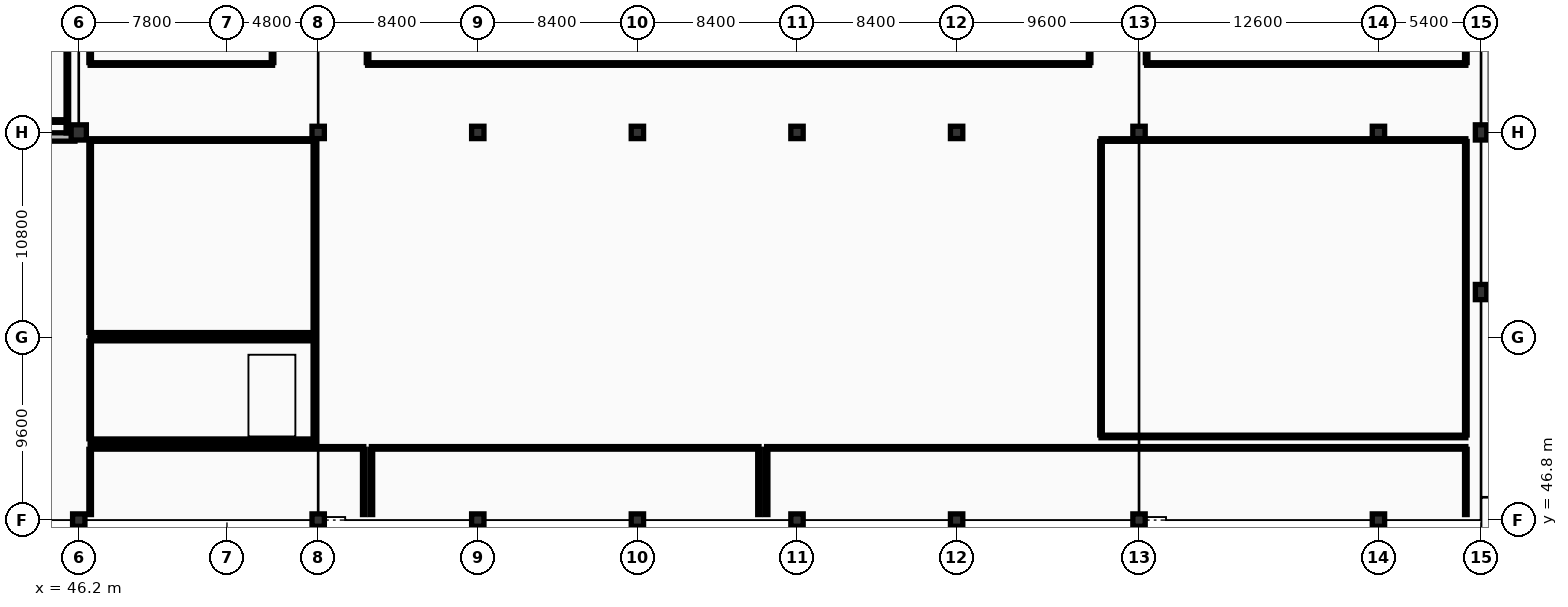
"""IFC4 building model, lengths in metres.
Left out: names, types, materials, properties, quantities, classifications, styles, units other than length and angle.
Written with IfcOpenShell. Run it as: python <this file> out.ifc"""

import sys

from ifc_helpers import new_model, si_unit, direction, frame, frame_2d, origin, origin_2d, place, context, subcontext, project, spatial, rectangle, extrude, element, fill, save


model = new_model("IFC4")
c1 = context("Model", 3, precision=1e-05, world=origin(), true_north=direction((0.0, 1.0)))
c2 = subcontext(c1, "Body", "Model", "MODEL_VIEW")
j1 = project(units=[si_unit("LENGTHUNIT", "METRE"), si_unit("PLANEANGLEUNIT", "RADIAN")], contexts=[c1])
p1 = place(None, origin())
s1 = spatial("IfcSite", under=j1, at=p1, CompositionType="ELEMENT")
p2 = place(p1, origin())
s2 = spatial("IfcBuilding", under=s1, at=p2, CompositionType="ELEMENT")
p3 = place(p2, origin())
s3 = spatial("IfcBuildingStorey", under=s2, at=p3, CompositionType="ELEMENT", Elevation=0.0)
p4 = place(p3, frame((46.2, 67.2, 0.0), z_axis=(0.0, 0.0, 1.0), x_axis=(1.0, 0.0, 0.0)))
e1 = element("IfcColumn", 1, at=p4, inside=s3, PredefinedType="COLUMN", context=c2, shape_type="SweptSolid", body=[
    extrude(rectangle(XDim=0.8, YDim=0.8, at=origin_2d()), origin(), (0.0, 0.0, 1.0), 5.4),
])
for number, where, z_axis, x_axis in (
    (2, (120.0, 58.8, 0.0), (0.0, 0.0, 1.0), (1.0, 0.0, 0.0)),
    (3, (120.0, 67.2, 0.0), (0.0, 0.0, 1.0), (1.0, 0.0, 0.0)),
):
    element("IfcColumn", number, at=place(p3, frame(where, z_axis=z_axis, x_axis=x_axis)), inside=s3, PredefinedType="COLUMN", context=c2, shape_type="SweptSolid", body=[
        extrude(rectangle(XDim=0.6, YDim=0.8, at=origin_2d()), origin(), (0.0, 0.0, 1.0), 5.4),
    ])
for number, where, z_axis, x_axis in (
    (4, (46.2, 46.8, 0.0), (0.0, 0.0, 1.0), (1.0, 0.0, 0.0)),
    (5, (58.8, 46.8, 0.0), (0.0, 0.0, 1.0), (1.0, 0.0, 0.0)),
    (6, (58.8, 67.2, 0.0), (0.0, 0.0, 1.0), (1.0, 0.0, 0.0)),
    (7, (67.2, 46.8, 0.0), (0.0, 0.0, 1.0), (1.0, 0.0, 0.0)),
    (8, (67.2, 67.2, 0.0), (0.0, 0.0, 1.0), (1.0, 0.0, 0.0)),
    (9, (75.6, 46.8, 0.0), (0.0, 0.0, 1.0), (1.0, 0.0, 0.0)),
    (10, (75.6, 67.2, 0.0), (0.0, 0.0, 1.0), (1.0, 0.0, 0.0)),
    (11, (84.0, 46.8, 0.0), (0.0, 0.0, 1.0), (1.0, 0.0, 0.0)),
    (12, (84.0, 67.2, 0.0), (0.0, 0.0, 1.0), (1.0, 0.0, 0.0)),
    (13, (92.4, 46.8, 0.0), (0.0, 0.0, 1.0), (1.0, 0.0, 0.0)),
    (14, (92.4, 67.2, 0.0), (0.0, 0.0, 1.0), (1.0, 0.0, 0.0)),
    (15, (102.0, 46.8, 0.0), (0.0, 0.0, 1.0), (1.0, 0.0, 0.0)),
    (16, (102.0, 67.2, 0.0), (0.0, 0.0, 1.0), (1.0, 0.0, 0.0)),
    (17, (114.6, 46.8, 0.0), (0.0, 0.0, 1.0), (1.0, 0.0, 0.0)),
    (18, (114.6, 67.2, 0.0), (0.0, 0.0, 1.0), (1.0, 0.0, 0.0)),
):
    element("IfcColumn", number, at=place(p3, frame(where, z_axis=z_axis, x_axis=x_axis)), inside=s3, PredefinedType="COLUMN", context=c2, shape_type="SweptSolid", body=[
        extrude(rectangle(XDim=0.65, YDim=0.65, at=origin_2d()), origin(), (0.0, 0.0, 1.0), 5.4),
    ])
p5 = place(p3, frame((38.45, 66.96, 0.0), z_axis=(0.0, 0.0, 1.0), x_axis=(1.0, 0.0, 0.0)))
e19 = element("IfcWall", 19, at=p5, inside=s3, PredefinedType="STANDARD", context=c2, shape_type="SweptSolid", body=[
    extrude(rectangle(XDim=7.55, YDim=0.44, at=frame_2d((3.775, 0.0))), origin(), (0.0, 0.0, 1.0), 4.13),
])
p6 = place(p3, frame((45.6, 67.8, 0.0), z_axis=(0.0, 0.0, 1.0), x_axis=(-1.0, 0.0, 0.0)))
e20 = element("IfcWall", 20, at=p6, inside=s3, PredefinedType="PARTITIONING", context=c2, shape_type="SweptSolid", body=[
    extrude(rectangle(XDim=21.8, YDim=0.135, at=frame_2d((10.9, 0.0))), origin(), (0.0, 0.0, 1.0), 4.58),
])
p7 = place(p3, frame((45.6, 85.522, 0.0), z_axis=(0.0, 0.0, 1.0), x_axis=(0.0, -1.0, 0.0)))
e21 = element("IfcWall", 21, at=p7, inside=s3, PredefinedType="PARTITIONING", context=c2, shape_type="SweptSolid", body=[
    extrude(rectangle(XDim=18.348, YDim=0.135, at=frame_2d((9.174, 0.0))), origin(), (0.0, 0.0, 1.0), 4.47),
])
p8 = place(p3, frame((46.8, 66.8, 0.0), z_axis=(0.0, 0.0, 1.0), x_axis=(1.0, 0.0, 0.0)))
e22 = element("IfcWall", 22, at=p8, inside=s3, PredefinedType="PARTITIONING", context=c2, shape_type="SweptSolid", body=[
    extrude(rectangle(XDim=11.8, YDim=0.135, at=frame_2d((5.9, 0.0))), origin(), (0.0, 0.0, 1.0), 4.13),
])
p9 = place(p8, frame((2.366, 0.0, 0.0)))
e23 = element("IfcOpeningElement", 23, at=p9, cuts=e22, PredefinedType="OPENING", context=c2, shape_type="SweptSolid", body=[
    extrude(rectangle(XDim=1.02, YDim=2.15, at=frame_2d((0.51, 1.075))), frame((0.0, 0.077, 0.0), z_axis=(0.0, -1.0, 0.0), x_axis=(1.0, 0.0, 0.0)), (0.0, 0.0, 1.0), 0.155),
])
p10 = place(p3, frame((58.6, 56.6, 0.0), z_axis=(0.0, 0.0, 1.0), x_axis=(-1.0, 0.0, 0.0)))
e24 = element("IfcWall", 24, at=p10, inside=s3, PredefinedType="PARTITIONING", context=c2, shape_type="SweptSolid", body=[
    extrude(rectangle(XDim=11.8, YDim=0.135, at=frame_2d((5.9, 0.0))), origin(), (0.0, 0.0, 1.0), 4.13),
])
p11 = place(p3, frame((46.8, 56.677, 0.0), z_axis=(0.0, 0.0, 1.0), x_axis=(0.0, 1.0, 0.0)))
e25 = element("IfcWall", 25, at=p11, inside=s3, PredefinedType="PARTITIONING", context=c2, shape_type="SweptSolid", body=[
    extrude(rectangle(XDim=10.045, YDim=0.135, at=frame_2d((5.022, 0.0))), origin(), (0.0, 0.0, 1.0), 4.23),
])
p12 = place(p3, frame((58.6, 66.722, 0.0), z_axis=(0.0, 0.0, 1.0), x_axis=(0.0, -1.0, 0.0)))
e26 = element("IfcWall", 26, at=p12, inside=s3, PredefinedType="PARTITIONING", context=c2, shape_type="SweptSolid", body=[
    extrude(rectangle(XDim=10.045, YDim=0.135, at=frame_2d((5.022, 0.0))), origin(), (0.0, 0.0, 1.0), 4.13),
])
for number, where, z_axis, x_axis in (
    (27, (46.8, 56.3, 0.0), (0.0, 0.0, 1.0), (1.0, 0.0, 0.0)),
    (28, (58.6, 51.0, 0.0), (0.0, 0.0, 1.0), (-1.0, 0.0, 0.0)),
):
    element("IfcWall", number, at=place(p3, frame(where, z_axis=z_axis, x_axis=x_axis)), inside=s3, PredefinedType="PARTITIONING", context=c2, shape_type="SweptSolid", body=[
        extrude(rectangle(XDim=11.8, YDim=0.135, at=frame_2d((5.9, 0.0))), origin(), (0.0, 0.0, 1.0), 4.13),
    ])
p13 = place(p3, frame((46.8, 51.077, 0.0), z_axis=(0.0, 0.0, 1.0), x_axis=(0.0, 1.0, 0.0)))
e29 = element("IfcWall", 29, at=p13, inside=s3, PredefinedType="PARTITIONING", context=c2, shape_type="SweptSolid", body=[
    extrude(rectangle(XDim=5.145, YDim=0.135, at=frame_2d((2.573, 0.0))), origin(), (0.0, 0.0, 1.0), 5.125),
])
p14 = place(p13, frame((1.923, 0.0, 0.0)))
e30 = element("IfcOpeningElement", 30, at=p14, cuts=e29, PredefinedType="OPENING", context=c2, shape_type="SweptSolid", body=[
    extrude(rectangle(XDim=0.95, YDim=2.15, at=frame_2d((0.475, 1.075))), frame((0.0, 0.077, 0.0), z_axis=(0.0, -1.0, 0.0), x_axis=(1.0, 0.0, 0.0)), (0.0, 0.0, 1.0), 0.155),
])
p15 = place(p3, frame((58.6, 56.222, 0.0), z_axis=(0.0, 0.0, 1.0), x_axis=(0.0, -1.0, 0.0)))
e31 = element("IfcWall", 31, at=p15, inside=s3, PredefinedType="PARTITIONING", context=c2, shape_type="SweptSolid", body=[
    extrude(rectangle(XDim=5.145, YDim=0.135, at=frame_2d((2.573, 0.0))), origin(), (0.0, 0.0, 1.0), 4.13),
])
p16 = place(p3, frame((46.8, 50.6, 0.0), z_axis=(0.0, 0.0, 1.0), x_axis=(1.0, 0.0, 0.0)))
e32 = element("IfcWall", 32, at=p16, inside=s3, PredefinedType="PARTITIONING", context=c2, shape_type="SweptSolid", body=[
    extrude(rectangle(XDim=14.4, YDim=0.135, at=frame_2d((7.2, 0.0))), origin(), (0.0, 0.0, 1.0), 4.13),
])
p17 = place(p16, frame((12.462, 0.0, 0.0)))
e33 = element("IfcOpeningElement", 33, at=p17, cuts=e32, PredefinedType="OPENING", context=c2, shape_type="SweptSolid", body=[
    extrude(rectangle(XDim=0.95, YDim=2.15, at=frame_2d((0.475, 1.075))), frame((0.0, 0.077, 0.0), z_axis=(0.0, -1.0, 0.0), x_axis=(1.0, 0.0, 0.0)), (0.0, 0.0, 1.0), 0.155),
])
p18 = place(p3, frame((46.8, 47.09, 0.0), z_axis=(0.0, 0.0, 1.0), x_axis=(0.0, 1.0, 0.0)))
e34 = element("IfcWall", 34, at=p18, inside=s3, PredefinedType="PARTITIONING", context=c2, shape_type="SweptSolid", body=[
    extrude(rectangle(XDim=3.432, YDim=0.135, at=frame_2d((1.716, 0.0))), origin(), (0.0, 0.0, 1.0), 4.23),
])
p19 = place(p3, frame((61.2, 50.522, 0.0), z_axis=(0.0, 0.0, 1.0), x_axis=(0.0, -1.0, 0.0)))
e35 = element("IfcWall", 35, at=p19, inside=s3, PredefinedType="PARTITIONING", context=c2, shape_type="SweptSolid", body=[
    extrude(rectangle(XDim=3.432, YDim=0.135, at=frame_2d((1.716, 0.0))), origin(), (0.0, 0.0, 1.0), 4.43),
])
p20 = place(p3, frame((61.6, 50.6, 0.0), z_axis=(0.0, 0.0, 1.0), x_axis=(1.0, 0.0, 0.0)))
e36 = element("IfcWall", 36, at=p20, inside=s3, PredefinedType="PARTITIONING", context=c2, shape_type="SweptSolid", body=[
    extrude(rectangle(XDim=20.4, YDim=0.135, at=frame_2d((10.2, 0.0))), origin(), (0.0, 0.0, 1.0), 5.125),
])
p21 = place(p20, frame((2.225, 0.0, 0.0)))
e37 = element("IfcOpeningElement", 37, at=p21, cuts=e36, PredefinedType="OPENING", context=c2, shape_type="SweptSolid", body=[
    extrude(rectangle(XDim=0.95, YDim=2.15, at=frame_2d((0.475, 1.075))), frame((0.0, 0.077, 0.0), z_axis=(0.0, -1.0, 0.0), x_axis=(1.0, 0.0, 0.0)), (0.0, 0.0, 1.0), 0.155),
])
for number, where, z_axis, x_axis in (
    (38, (61.6, 47.09, 0.0), (0.0, 0.0, 1.0), (0.0, 1.0, 0.0)),
    (39, (82.0, 50.522, 0.0), (0.0, 0.0, 1.0), (0.0, -1.0, 0.0)),
):
    element("IfcWall", number, at=place(p3, frame(where, z_axis=z_axis, x_axis=x_axis)), inside=s3, PredefinedType="PARTITIONING", context=c2, shape_type="SweptSolid", body=[
        extrude(rectangle(XDim=3.432, YDim=0.135, at=frame_2d((1.716, 0.0))), origin(), (0.0, 0.0, 1.0), 4.43),
    ])
p22 = place(p3, frame((82.4, 50.6, 0.0), z_axis=(0.0, 0.0, 1.0), x_axis=(1.0, 0.0, 0.0)))
e40 = element("IfcWall", 40, at=p22, inside=s3, PredefinedType="PARTITIONING", context=c2, shape_type="SweptSolid", body=[
    extrude(rectangle(XDim=36.8, YDim=0.135, at=frame_2d((18.4, 0.0))), origin(), (0.0, 0.0, 1.0), 4.13),
])
p23 = place(p22, frame((2.107, 0.0, 0.0)))
e41 = element("IfcOpeningElement", 41, at=p23, cuts=e40, PredefinedType="OPENING", context=c2, shape_type="SweptSolid", body=[
    extrude(rectangle(XDim=0.95, YDim=2.15, at=frame_2d((0.475, 1.075))), frame((0.0, 0.077, 0.0), z_axis=(0.0, -1.0, 0.0), x_axis=(1.0, 0.0, 0.0)), (0.0, 0.0, 1.0), 0.155),
])
p24 = place(p3, frame((82.4, 47.09, 0.0), z_axis=(0.0, 0.0, 1.0), x_axis=(0.0, 1.0, 0.0)))
e42 = element("IfcWall", 42, at=p24, inside=s3, PredefinedType="PARTITIONING", context=c2, shape_type="SweptSolid", body=[
    extrude(rectangle(XDim=3.432, YDim=0.135, at=frame_2d((1.716, 0.0))), origin(), (0.0, 0.0, 1.0), 4.43),
])
p25 = place(p3, frame((119.2, 50.522, 0.0), z_axis=(0.0, 0.0, 1.0), x_axis=(0.0, -1.0, 0.0)))
e43 = element("IfcWall", 43, at=p25, inside=s3, PredefinedType="PARTITIONING", context=c2, shape_type="SweptSolid", body=[
    extrude(rectangle(XDim=3.432, YDim=0.135, at=frame_2d((1.716, 0.0))), origin(), (0.0, 0.0, 1.0), 5.125),
])
p26 = place(p3, frame((56.4, 70.8, 0.0), z_axis=(0.0, 0.0, 1.0), x_axis=(-1.0, 0.0, 0.0)))
e44 = element("IfcWall", 44, at=p26, inside=s3, PredefinedType="PARTITIONING", context=c2, shape_type="SweptSolid", body=[
    extrude(rectangle(XDim=9.6, YDim=0.135, at=frame_2d((4.8, 0.0))), origin(), (0.0, 0.0, 1.0), 4.53),
])
p27 = place(p26, frame((1.94, 0.0, 0.0)))
e45 = element("IfcOpeningElement", 45, at=p27, cuts=e44, PredefinedType="OPENING", context=c2, shape_type="SweptSolid", body=[
    extrude(rectangle(XDim=0.95, YDim=2.15, at=frame_2d((0.475, 1.075))), frame((0.0, 0.077, 0.0), z_axis=(0.0, -1.0, 0.0), x_axis=(1.0, 0.0, 0.0)), (0.0, 0.0, 1.0), 0.155),
])
for number, where, z_axis, x_axis in (
    (46, (46.8, 70.877, 0.0), (0.0, 0.0, 1.0), (0.0, 1.0, 0.0)),
    (47, (56.4, 78.86, 0.0), (0.0, 0.0, 1.0), (0.0, -1.0, 0.0)),
):
    element("IfcWall", number, at=place(p3, frame(where, z_axis=z_axis, x_axis=x_axis)), inside=s3, PredefinedType="PARTITIONING", context=c2, shape_type="SweptSolid", body=[
        extrude(rectangle(XDim=7.983, YDim=0.135, at=frame_2d((3.991, 0.0))), origin(), (0.0, 0.0, 1.0), 4.23),
    ])
p28 = place(p3, frame((99.4, 70.8, 0.0), z_axis=(0.0, 0.0, 1.0), x_axis=(-1.0, 0.0, 0.0)))
e48 = element("IfcWall", 48, at=p28, inside=s3, PredefinedType="PARTITIONING", context=c2, shape_type="SweptSolid", body=[
    extrude(rectangle(XDim=38.0, YDim=0.135, at=frame_2d((19.0, 0.0))), origin(), (0.0, 0.0, 1.0), 4.53),
])
p29 = place(p28, frame((2.167, 0.0, 0.0)))
e49 = element("IfcOpeningElement", 49, at=p29, cuts=e48, PredefinedType="OPENING", context=c2, shape_type="SweptSolid", body=[
    extrude(rectangle(XDim=0.95, YDim=2.15, at=frame_2d((0.475, 1.075))), frame((0.0, 0.077, 0.0), z_axis=(0.0, -1.0, 0.0), x_axis=(1.0, 0.0, 0.0)), (0.0, 0.0, 1.0), 0.155),
])
p30 = place(p3, frame((61.4, 70.877, 0.0), z_axis=(0.0, 0.0, 1.0), x_axis=(0.0, 1.0, 0.0)))
e50 = element("IfcWall", 50, at=p30, inside=s3, PredefinedType="PARTITIONING", context=c2, shape_type="SweptSolid", body=[
    extrude(rectangle(XDim=7.645, YDim=0.135, at=frame_2d((3.823, 0.0))), origin(), (0.0, 0.0, 1.0), 4.43),
])
p31 = place(p3, frame((99.4, 78.522, 0.0), z_axis=(0.0, 0.0, 1.0), x_axis=(0.0, -1.0, 0.0)))
e51 = element("IfcWall", 51, at=p31, inside=s3, PredefinedType="PARTITIONING", context=c2, shape_type="SweptSolid", body=[
    extrude(rectangle(XDim=7.645, YDim=0.135, at=frame_2d((3.823, 0.0))), origin(), (0.0, 0.0, 1.0), 4.33),
])
p32 = place(p3, frame((119.2, 70.8, 0.0), z_axis=(0.0, 0.0, 1.0), x_axis=(-1.0, 0.0, 0.0)))
e52 = element("IfcWall", 52, at=p32, inside=s3, PredefinedType="PARTITIONING", context=c2, shape_type="SweptSolid", body=[
    extrude(rectangle(XDim=16.8, YDim=0.135, at=frame_2d((8.4, 0.0))), origin(), (0.0, 0.0, 1.0), 4.53),
])
p33 = place(p32, frame((2.623, 0.0, 0.0)))
e53 = element("IfcOpeningElement", 53, at=p33, cuts=e52, PredefinedType="OPENING", context=c2, shape_type="SweptSolid", body=[
    extrude(rectangle(XDim=0.95, YDim=2.15, at=frame_2d((0.475, 1.075))), frame((0.0, 0.077, 0.0), z_axis=(0.0, -1.0, 0.0), x_axis=(1.0, 0.0, 0.0)), (0.0, 0.0, 1.0), 0.155),
])
p34 = place(p3, frame((102.4, 70.877, 0.0), z_axis=(0.0, 0.0, 1.0), x_axis=(0.0, 1.0, 0.0)))
e54 = element("IfcWall", 54, at=p34, inside=s3, PredefinedType="PARTITIONING", context=c2, shape_type="SweptSolid", body=[
    extrude(rectangle(XDim=7.983, YDim=0.135, at=frame_2d((3.991, 0.0))), origin(), (0.0, 0.0, 1.0), 4.23),
])
p35 = place(p3, frame((119.2, 78.522, 0.0), z_axis=(0.0, 0.0, 1.0), x_axis=(0.0, -1.0, 0.0)))
e55 = element("IfcWall", 55, at=p35, inside=s3, PredefinedType="PARTITIONING", context=c2, shape_type="SweptSolid", body=[
    extrude(rectangle(XDim=7.645, YDim=0.135, at=frame_2d((3.823, 0.0))), origin(), (0.0, 0.0, 1.0), 4.43),
])
p36 = place(p3, frame((100.0, 66.8, 0.0), z_axis=(0.0, 0.0, 1.0), x_axis=(1.0, 0.0, 0.0)))
e56 = element("IfcWall", 56, at=p36, inside=s3, PredefinedType="PARTITIONING", context=c2, shape_type="SweptSolid", body=[
    extrude(rectangle(XDim=19.2, YDim=0.135, at=frame_2d((9.6, 0.0))), origin(), (0.0, 0.0, 1.0), 4.13),
])
p37 = place(p36, frame((5.615, 0.0, 0.0)))
e57 = element("IfcOpeningElement", 57, at=p37, cuts=e56, PredefinedType="OPENING", context=c2, shape_type="SweptSolid", body=[
    extrude(rectangle(XDim=0.95, YDim=2.15, at=frame_2d((0.475, 1.075))), frame((0.0, 0.077, 0.0), z_axis=(0.0, -1.0, 0.0), x_axis=(1.0, 0.0, 0.0)), (0.0, 0.0, 1.0), 0.155),
])
p38 = place(p3, frame((119.2, 51.2, 0.0), z_axis=(0.0, 0.0, 1.0), x_axis=(-1.0, 0.0, 0.0)))
e58 = element("IfcWall", 58, at=p38, inside=s3, PredefinedType="PARTITIONING", context=c2, shape_type="SweptSolid", body=[
    extrude(rectangle(XDim=19.2, YDim=0.135, at=frame_2d((9.6, 0.0))), origin(), (0.0, 0.0, 1.0), 4.13),
])
for number, where, z_axis, x_axis in (
    (59, (100.0, 51.278, 0.0), (0.0, 0.0, 1.0), (0.0, 1.0, 0.0)),
    (60, (119.2, 66.722, 0.0), (0.0, 0.0, 1.0), (0.0, -1.0, 0.0)),
):
    element("IfcWall", number, at=place(p3, frame(where, z_axis=z_axis, x_axis=x_axis)), inside=s3, PredefinedType="PARTITIONING", context=c2, shape_type="SweptSolid", body=[
        extrude(rectangle(XDim=15.445, YDim=0.135, at=frame_2d((7.722, 0.0))), origin(), (0.0, 0.0, 1.0), 5.125),
    ])
p39 = place(p9, origin())
e61 = element("IfcDoor", 61, at=p39, inside=s3, OperationType="SINGLE_SWING_LEFT", PredefinedType="DOOR", context=c2, shape_type="SweptSolid", body=[
    extrude(rectangle(XDim=1.02, YDim=2.15, at=frame_2d((0.51, 1.075))), frame((0.0, 0.025, 0.0), z_axis=(0.0, -1.0, 0.0), x_axis=(1.0, 0.0, 0.0)), (0.0, 0.0, 1.0), 0.05),
])
fill(e23, e61)
p40 = place(p14, origin())
e62 = element("IfcDoor", 62, at=p40, inside=s3, OperationType="SINGLE_SWING_LEFT", PredefinedType="DOOR", context=c2, shape_type="SweptSolid", body=[
    extrude(rectangle(XDim=0.95, YDim=2.15, at=frame_2d((0.475, 1.075))), frame((0.0, 0.025, 0.0), z_axis=(0.0, -1.0, 0.0), x_axis=(1.0, 0.0, 0.0)), (0.0, 0.0, 1.0), 0.05),
])
fill(e30, e62)
p41 = place(p17, origin())
e63 = element("IfcDoor", 63, at=p41, inside=s3, OperationType="SINGLE_SWING_LEFT", PredefinedType="DOOR", context=c2, shape_type="SweptSolid", body=[
    extrude(rectangle(XDim=0.95, YDim=2.15, at=frame_2d((0.475, 1.075))), frame((0.0, 0.025, 0.0), z_axis=(0.0, -1.0, 0.0), x_axis=(1.0, 0.0, 0.0)), (0.0, 0.0, 1.0), 0.05),
])
fill(e33, e63)
p42 = place(p21, origin())
e64 = element("IfcDoor", 64, at=p42, inside=s3, OperationType="SINGLE_SWING_RIGHT", PredefinedType="DOOR", context=c2, shape_type="SweptSolid", body=[
    extrude(rectangle(XDim=0.95, YDim=2.15, at=frame_2d((0.475, 1.075))), frame((0.0, 0.025, 0.0), z_axis=(0.0, -1.0, 0.0), x_axis=(1.0, 0.0, 0.0)), (0.0, 0.0, 1.0), 0.05),
])
fill(e37, e64)
p43 = place(p23, origin())
e65 = element("IfcDoor", 65, at=p43, inside=s3, OperationType="SINGLE_SWING_LEFT", PredefinedType="DOOR", context=c2, shape_type="SweptSolid", body=[
    extrude(rectangle(XDim=0.95, YDim=2.15, at=frame_2d((0.475, 1.075))), frame((0.0, 0.025, 0.0), z_axis=(0.0, -1.0, 0.0), x_axis=(1.0, 0.0, 0.0)), (0.0, 0.0, 1.0), 0.05),
])
fill(e41, e65)
p44 = place(p27, origin())
e66 = element("IfcDoor", 66, at=p44, inside=s3, OperationType="SINGLE_SWING_RIGHT", PredefinedType="DOOR", context=c2, shape_type="SweptSolid", body=[
    extrude(rectangle(XDim=0.95, YDim=2.15, at=frame_2d((0.475, 1.075))), frame((0.0, 0.025, 0.0), z_axis=(0.0, -1.0, 0.0), x_axis=(1.0, 0.0, 0.0)), (0.0, 0.0, 1.0), 0.05),
])
fill(e45, e66)
p45 = place(p29, origin())
e67 = element("IfcDoor", 67, at=p45, inside=s3, OperationType="SINGLE_SWING_LEFT", PredefinedType="DOOR", context=c2, shape_type="SweptSolid", body=[
    extrude(rectangle(XDim=0.95, YDim=2.15, at=frame_2d((0.475, 1.075))), frame((0.0, 0.025, 0.0), z_axis=(0.0, -1.0, 0.0), x_axis=(1.0, 0.0, 0.0)), (0.0, 0.0, 1.0), 0.05),
])
fill(e49, e67)
p46 = place(p33, origin())
e68 = element("IfcDoor", 68, at=p46, inside=s3, OperationType="SINGLE_SWING_RIGHT", PredefinedType="DOOR", context=c2, shape_type="SweptSolid", body=[
    extrude(rectangle(XDim=0.95, YDim=2.15, at=frame_2d((0.475, 1.075))), frame((0.0, 0.025, 0.0), z_axis=(0.0, -1.0, 0.0), x_axis=(1.0, 0.0, 0.0)), (0.0, 0.0, 1.0), 0.05),
])
fill(e53, e68)
p47 = place(p37, origin())
e69 = element("IfcDoor", 69, at=p47, inside=s3, OperationType="SINGLE_SWING_LEFT", PredefinedType="DOOR", context=c2, shape_type="SweptSolid", body=[
    extrude(rectangle(XDim=0.95, YDim=2.15, at=frame_2d((0.475, 1.075))), frame((0.0, 0.025, 0.0), z_axis=(0.0, -1.0, 0.0), x_axis=(1.0, 0.0, 0.0)), (0.0, 0.0, 1.0), 0.05),
])
fill(e57, e69)
save(model, sys.argv[1])
